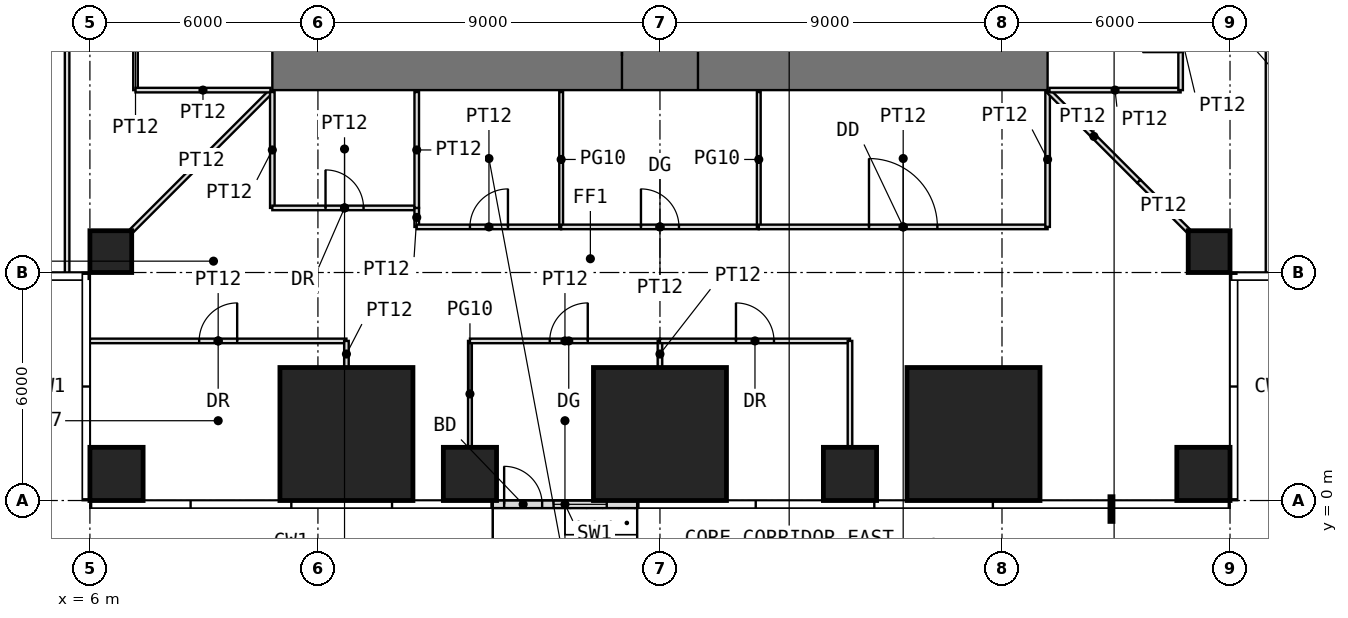
"""IFC4 building model, lengths in metres.
Left out: names, types, materials, properties, quantities, classifications, styles, units other than length and angle.
Written with IfcOpenShell. Run it as: python <this file> out.ifc"""

import sys

from ifc_helpers import new_model, si_unit, direction, frame, frame_2d, origin, origin_2d, place, context, subcontext, project, spatial, rectangle, extrude, element, fill, save


model = new_model("IFC4")
c1 = context("Model", 3, precision=1e-05, world=origin(), true_north=direction((0.0, 1.0)))
c2 = subcontext(c1, "Body", "Model", "MODEL_VIEW")
j1 = project(units=[si_unit("LENGTHUNIT", "METRE"), si_unit("PLANEANGLEUNIT", "RADIAN")], contexts=[c1])
p1 = place(None, origin())
s1 = spatial("IfcSite", under=j1, at=p1, CompositionType="ELEMENT")
p2 = place(p1, origin())
s2 = spatial("IfcBuilding", under=s1, at=p2, CompositionType="ELEMENT")
p3 = place(p2, frame((0.0, 0.0, 22.5)))
s3 = spatial("IfcBuildingStorey", under=s2, at=p3, CompositionType="ELEMENT", Elevation=22.5)
p4 = place(p3, frame((6.7, 0.7, 0.0), z_axis=(0.0, 0.0, 1.0), x_axis=(1.0, 0.0, 0.0)))
e1 = element("IfcColumn", 1, at=p4, inside=s3, PredefinedType="COLUMN", context=c2, shape_type="SweptSolid", body=[
    extrude(rectangle(XDim=1.4, YDim=1.4, at=origin_2d()), origin(), (0.0, 0.0, 1.0), 4.0),
])
p5 = place(p3, frame((12.75, 1.75, 0.0), z_axis=(0.0, 0.0, 1.0), x_axis=(1.0, 0.0, 0.0)))
e2 = element("IfcColumn", 2, at=p5, inside=s3, PredefinedType="COLUMN", context=c2, shape_type="SweptSolid", body=[
    extrude(rectangle(XDim=3.5, YDim=3.5, at=origin_2d()), origin(), (0.0, 0.0, 1.0), 4.0),
])
p6 = place(p3, frame((16.0, 0.7, 0.0), z_axis=(0.0, 0.0, 1.0), x_axis=(1.0, 0.0, 0.0)))
e3 = element("IfcColumn", 3, at=p6, inside=s3, PredefinedType="COLUMN", context=c2, shape_type="SweptSolid", body=[
    extrude(rectangle(XDim=1.4, YDim=1.4, at=origin_2d()), origin(), (0.0, 0.0, 1.0), 4.0),
])
p7 = place(p3, frame((21.0, 1.75, 0.0), z_axis=(0.0, 0.0, 1.0), x_axis=(1.0, 0.0, 0.0)))
e4 = element("IfcColumn", 4, at=p7, inside=s3, PredefinedType="COLUMN", context=c2, shape_type="SweptSolid", body=[
    extrude(rectangle(XDim=3.5, YDim=3.5, at=origin_2d()), origin(), (0.0, 0.0, 1.0), 4.0),
])
p8 = place(p3, frame((26.0, 0.7, 0.0), z_axis=(0.0, 0.0, 1.0), x_axis=(1.0, 0.0, 0.0)))
e5 = element("IfcColumn", 5, at=p8, inside=s3, PredefinedType="COLUMN", context=c2, shape_type="SweptSolid", body=[
    extrude(rectangle(XDim=1.4, YDim=1.4, at=origin_2d()), origin(), (0.0, 0.0, 1.0), 4.0),
])
p9 = place(p3, frame((29.25, 1.75, 0.0), z_axis=(0.0, 0.0, 1.0), x_axis=(1.0, 0.0, 0.0)))
e6 = element("IfcColumn", 6, at=p9, inside=s3, PredefinedType="COLUMN", context=c2, shape_type="SweptSolid", body=[
    extrude(rectangle(XDim=3.5, YDim=3.5, at=origin_2d()), origin(), (0.0, 0.0, 1.0), 4.0),
])
p10 = place(p3, frame((35.3, 0.7, 0.0), z_axis=(0.0, 0.0, 1.0), x_axis=(1.0, 0.0, 0.0)))
e7 = element("IfcColumn", 7, at=p10, inside=s3, PredefinedType="COLUMN", context=c2, shape_type="SweptSolid", body=[
    extrude(rectangle(XDim=1.4, YDim=1.4, at=origin_2d()), origin(), (0.0, 0.0, 1.0), 4.0),
])
for number, where, z_axis, x_axis in (
    (8, (6.55, 6.55, 0.0), (0.0, 0.0, 1.0), (1.0, 0.0, 0.0)),
    (9, (35.45, 6.55, 0.0), (0.0, 0.0, 1.0), (1.0, 0.0, 0.0)),
):
    element("IfcColumn", number, at=place(p3, frame(where, z_axis=z_axis, x_axis=x_axis)), inside=s3, PredefinedType="COLUMN", context=c2, shape_type="SweptSolid", body=[
        extrude(rectangle(XDim=1.1, YDim=1.1, at=origin_2d()), origin(), (0.0, 0.0, 1.0), 4.0),
    ])
p11 = place(p3, frame((16.6, -0.1, 0.0), z_axis=(0.0, 0.0, 1.0), x_axis=(1.0, 0.0, 0.0)))
e10 = element("IfcWall", 10, at=p11, inside=s3, PredefinedType="USERDEFINED", context=c2, shape_type="SweptSolid", body=[
    extrude(rectangle(XDim=3.8, YDim=0.2, at=frame_2d((1.9, 0.0))), origin(), (0.0, 0.0, 1.0), 3.75),
])
p12 = place(p11, frame((0.3, 0.0, 0.0)))
e11 = element("IfcOpeningElement", 11, at=p12, cuts=e10, PredefinedType="OPENING", context=c2, shape_type="SweptSolid", body=[
    extrude(rectangle(XDim=1.0, YDim=2.4, at=frame_2d((0.5, 1.2))), frame((0.0, 0.11, 0.0), z_axis=(0.0, -1.0, 0.0), x_axis=(1.0, 0.0, 0.0)), (0.0, 0.0, 1.0), 0.22),
])
p13 = place(p11, frame((1.6, 0.0, 0.3)))
e12 = element("IfcOpeningElement", 12, at=p13, cuts=e10, PredefinedType="OPENING", context=c2, shape_type="SweptSolid", body=[
    extrude(rectangle(XDim=1.4, YDim=2.7, at=frame_2d((0.7, 1.35))), frame((0.0, 0.11, 0.0), z_axis=(0.0, -1.0, 0.0), x_axis=(1.0, 0.0, 0.0)), (0.0, 0.0, 1.0), 0.22),
])
p14 = place(p3, frame((10.8, 11.7, -0.05), z_axis=(0.0, 0.0, 1.0), x_axis=(1.0, 0.0, 0.0)))
e13 = element("IfcWall", 13, at=p14, inside=s3, PredefinedType="SHEAR", context=c2, shape_type="SweptSolid", body=[
    extrude(rectangle(XDim=20.4, YDim=1.8, at=frame_2d((10.2, 0.0))), origin(), (0.0, 0.0, 1.0), 4.0),
])
p15 = place(p14, frame((9.2, 0.0, 0.05)))
e14 = element("IfcOpeningElement", 14, at=p15, cuts=e13, PredefinedType="OPENING", context=c2, shape_type="SweptSolid", body=[
    extrude(rectangle(XDim=2.0, YDim=2.2, at=frame_2d((1.0, 1.1))), frame((0.0, 0.91, 0.0), z_axis=(0.0, -1.0, 0.0), x_axis=(1.0, 0.0, 0.0)), (0.0, 0.0, 1.0), 1.82),
])
p16 = place(p3, frame((5.4, 6.0, 0.0), z_axis=(0.0, 0.0, 1.0), x_axis=(0.0, 1.0, 0.0)))
e15 = element("IfcWall", 15, at=p16, inside=s3, PredefinedType="PARTITIONING", context=c2, shape_type="SweptSolid", body=[
    extrude(rectangle(XDim=30.0, YDim=0.12, at=frame_2d((15.0, 0.0))), origin(), (0.0, 0.0, 1.0), 3.75),
])
p17 = place(p16, frame((14.5, 0.0, 0.0)))
e16 = element("IfcOpeningElement", 16, at=p17, cuts=e15, PredefinedType="OPENING", context=c2, shape_type="SweptSolid", body=[
    extrude(rectangle(XDim=1.0, YDim=2.4, at=frame_2d((0.5, 1.2))), frame((0.0, 0.07, 0.0), z_axis=(0.0, -1.0, 0.0), x_axis=(1.0, 0.0, 0.0)), (0.0, 0.0, 1.0), 0.14),
])
p18 = place(p3, frame((6.0, 4.2, 0.0), z_axis=(0.0, 0.0, 1.0), x_axis=(1.0, 0.0, 0.0)))
e17 = element("IfcWall", 17, at=p18, inside=s3, PredefinedType="PARTITIONING", context=c2, shape_type="SweptSolid", body=[
    extrude(rectangle(XDim=6.75, YDim=0.12, at=frame_2d((3.375, 0.0))), origin(), (0.0, 0.0, 1.0), 3.75),
])
p19 = place(p18, frame((2.875, 0.0, 0.0)))
e18 = element("IfcOpeningElement", 18, at=p19, cuts=e17, PredefinedType="OPENING", context=c2, shape_type="SweptSolid", body=[
    extrude(rectangle(XDim=1.0, YDim=2.2, at=frame_2d((0.5, 1.1))), frame((0.0, 0.07, 0.0), z_axis=(0.0, -1.0, 0.0), x_axis=(1.0, 0.0, 0.0)), (0.0, 0.0, 1.0), 0.14),
])
p20 = place(p3, frame((7.11, 7.11, 0.0), z_axis=(0.0, 0.0, 1.0), x_axis=(0.707106781187, 0.707106781187, 0.0)))
e19 = element("IfcWall", 19, at=p20, inside=s3, PredefinedType="PARTITIONING", context=c2, shape_type="SweptSolid", body=[
    extrude(rectangle(XDim=5.168, YDim=0.12, at=frame_2d((2.584, 0.0))), origin(), (0.0, 0.0, 1.0), 3.75),
])
p21 = place(p3, frame((7.2, 10.8, 0.0), z_axis=(0.0, 0.0, 1.0), x_axis=(0.0, 1.0, 0.0)))
e20 = element("IfcWall", 20, at=p21, inside=s3, PredefinedType="PARTITIONING", context=c2, shape_type="SweptSolid", body=[
    extrude(rectangle(XDim=3.8, YDim=0.12, at=frame_2d((1.9, 0.0))), origin(), (0.0, 0.0, 1.0), 3.75),
])
p22 = place(p21, frame((1.4, 0.0, 0.0)))
e21 = element("IfcOpeningElement", 21, at=p22, cuts=e20, PredefinedType="OPENING", context=c2, shape_type="SweptSolid", body=[
    extrude(rectangle(XDim=1.0, YDim=2.2, at=frame_2d((0.5, 1.1))), frame((0.0, 0.07, 0.0), z_axis=(0.0, -1.0, 0.0), x_axis=(1.0, 0.0, 0.0)), (0.0, 0.0, 1.0), 0.14),
])
p23 = place(p3, frame((7.2, 10.8, 0.0), z_axis=(0.0, 0.0, 1.0), x_axis=(1.0, 0.0, 0.0)))
e22 = element("IfcWall", 22, at=p23, inside=s3, PredefinedType="PARTITIONING", context=c2, shape_type="SweptSolid", body=[
    extrude(rectangle(XDim=3.55, YDim=0.12, at=frame_2d((1.775, 0.0))), origin(), (0.0, 0.0, 1.0), 3.75),
])
p24 = place(p3, frame((10.8, 7.7, 0.0), z_axis=(0.0, 0.0, 1.0), x_axis=(0.0, 1.0, 0.0)))
e23 = element("IfcWall", 23, at=p24, inside=s3, PredefinedType="PARTITIONING", context=c2, shape_type="SweptSolid", body=[
    extrude(rectangle(XDim=3.05, YDim=0.12, at=frame_2d((1.525, 0.0))), origin(), (0.0, 0.0, 1.0), 3.75),
])
p25 = place(p3, frame((10.8, 7.7, 0.0), z_axis=(0.0, 0.0, 1.0), x_axis=(1.0, 0.0, 0.0)))
e24 = element("IfcWall", 24, at=p25, inside=s3, PredefinedType="PARTITIONING", context=c2, shape_type="SweptSolid", body=[
    extrude(rectangle(XDim=3.8, YDim=0.12, at=frame_2d((1.9, 0.0))), origin(), (0.0, 0.0, 1.0), 3.75),
])
p26 = place(p25, frame((1.4, 0.0, 0.0)))
e25 = element("IfcOpeningElement", 25, at=p26, cuts=e24, PredefinedType="OPENING", context=c2, shape_type="SweptSolid", body=[
    extrude(rectangle(XDim=1.0, YDim=2.2, at=frame_2d((0.5, 1.1))), frame((0.0, 0.07, 0.0), z_axis=(0.0, -1.0, 0.0), x_axis=(1.0, 0.0, 0.0)), (0.0, 0.0, 1.0), 0.14),
])
p27 = place(p3, frame((12.75, 3.51, 0.0), z_axis=(0.0, 0.0, 1.0), x_axis=(0.0, 1.0, 0.0)))
e26 = element("IfcWall", 26, at=p27, inside=s3, PredefinedType="PARTITIONING", context=c2, shape_type="SweptSolid", body=[
    extrude(rectangle(XDim=0.69, YDim=0.12, at=frame_2d((0.345, 0.0))), origin(), (0.0, 0.0, 1.0), 3.75),
])
p28 = place(p3, frame((14.6, 7.2, 0.0), z_axis=(0.0, 0.0, 1.0), x_axis=(0.0, 1.0, 0.0)))
e27 = element("IfcWall", 27, at=p28, inside=s3, PredefinedType="PARTITIONING", context=c2, shape_type="SweptSolid", body=[
    extrude(rectangle(XDim=0.5, YDim=0.12, at=frame_2d((0.25, 0.0))), origin(), (0.0, 0.0, 1.0), 3.75),
])
p29 = place(p3, frame((14.6, 7.2, 0.0), z_axis=(0.0, 0.0, 1.0), x_axis=(1.0, 0.0, 0.0)))
e28 = element("IfcWall", 28, at=p29, inside=s3, PredefinedType="PARTITIONING", context=c2, shape_type="SweptSolid", body=[
    extrude(rectangle(XDim=3.8, YDim=0.12, at=frame_2d((1.9, 0.0))), origin(), (0.0, 0.0, 1.0), 3.75),
])
p30 = place(p29, frame((1.4, 0.0, 0.0)))
e29 = element("IfcOpeningElement", 29, at=p30, cuts=e28, PredefinedType="OPENING", context=c2, shape_type="SweptSolid", body=[
    extrude(rectangle(XDim=1.0, YDim=2.4, at=frame_2d((0.5, 1.2))), frame((0.0, 0.07, 0.0), z_axis=(0.0, -1.0, 0.0), x_axis=(1.0, 0.0, 0.0)), (0.0, 0.0, 1.0), 0.14),
])
p31 = place(p3, frame((14.6, 7.7, 0.0), z_axis=(0.0, 0.0, 1.0), x_axis=(0.0, 1.0, 0.0)))
e30 = element("IfcWall", 30, at=p31, inside=s3, PredefinedType="PARTITIONING", context=c2, shape_type="SweptSolid", body=[
    extrude(rectangle(XDim=3.05, YDim=0.12, at=frame_2d((1.525, 0.0))), origin(), (0.0, 0.0, 1.0), 3.75),
])
p32 = place(p3, frame((16.0, 1.41, 0.0), z_axis=(0.0, 0.0, 1.0), x_axis=(0.0, 1.0, 0.0)))
e31 = element("IfcWall", 31, at=p32, inside=s3, PredefinedType="PARTITIONING", context=c2, shape_type="SweptSolid", body=[
    extrude(rectangle(XDim=2.79, YDim=0.1, at=frame_2d((1.395, 0.0))), origin(), (0.0, 0.0, 1.0), 3.75),
])
p33 = place(p3, frame((16.0, 4.2, 0.0), z_axis=(0.0, 0.0, 1.0), x_axis=(1.0, 0.0, 0.0)))
e32 = element("IfcWall", 32, at=p33, inside=s3, PredefinedType="PARTITIONING", context=c2, shape_type="SweptSolid", body=[
    extrude(rectangle(XDim=5.0, YDim=0.12, at=frame_2d((2.5, 0.0))), origin(), (0.0, 0.0, 1.0), 3.75),
])
p34 = place(p33, frame((2.1, 0.0, 0.0)))
e33 = element("IfcOpeningElement", 33, at=p34, cuts=e32, PredefinedType="OPENING", context=c2, shape_type="SweptSolid", body=[
    extrude(rectangle(XDim=1.0, YDim=2.4, at=frame_2d((0.5, 1.2))), frame((0.0, 0.07, 0.0), z_axis=(0.0, -1.0, 0.0), x_axis=(1.0, 0.0, 0.0)), (0.0, 0.0, 1.0), 0.14),
])
p35 = place(p3, frame((18.4, 7.2, 0.0), z_axis=(0.0, 0.0, 1.0), x_axis=(0.0, 1.0, 0.0)))
e34 = element("IfcWall", 34, at=p35, inside=s3, PredefinedType="PARTITIONING", context=c2, shape_type="SweptSolid", body=[
    extrude(rectangle(XDim=3.55, YDim=0.1, at=frame_2d((1.775, 0.0))), origin(), (0.0, 0.0, 1.0), 3.75),
])
p36 = place(p3, frame((18.4, 7.2, 0.0), z_axis=(0.0, 0.0, 1.0), x_axis=(1.0, 0.0, 0.0)))
e35 = element("IfcWall", 35, at=p36, inside=s3, PredefinedType="PARTITIONING", context=c2, shape_type="SweptSolid", body=[
    extrude(rectangle(XDim=5.2, YDim=0.12, at=frame_2d((2.6, 0.0))), origin(), (0.0, 0.0, 1.0), 3.75),
])
p37 = place(p36, frame((2.1, 0.0, 0.0)))
e36 = element("IfcOpeningElement", 36, at=p37, cuts=e35, PredefinedType="OPENING", context=c2, shape_type="SweptSolid", body=[
    extrude(rectangle(XDim=1.0, YDim=2.4, at=frame_2d((0.5, 1.2))), frame((0.0, 0.07, 0.0), z_axis=(0.0, -1.0, 0.0), x_axis=(1.0, 0.0, 0.0)), (0.0, 0.0, 1.0), 0.14),
])
p38 = place(p3, frame((21.0, 3.51, 0.0), z_axis=(0.0, 0.0, 1.0), x_axis=(0.0, 1.0, 0.0)))
e37 = element("IfcWall", 37, at=p38, inside=s3, PredefinedType="PARTITIONING", context=c2, shape_type="SweptSolid", body=[
    extrude(rectangle(XDim=0.69, YDim=0.12, at=frame_2d((0.345, 0.0))), origin(), (0.0, 0.0, 1.0), 3.75),
])
p39 = place(p3, frame((21.0, 4.2, 0.0), z_axis=(0.0, 0.0, 1.0), x_axis=(1.0, 0.0, 0.0)))
e38 = element("IfcWall", 38, at=p39, inside=s3, PredefinedType="PARTITIONING", context=c2, shape_type="SweptSolid", body=[
    extrude(rectangle(XDim=5.0, YDim=0.12, at=frame_2d((2.5, 0.0))), origin(), (0.0, 0.0, 1.0), 3.75),
])
p40 = place(p39, frame((2.0, 0.0, 0.0)))
e39 = element("IfcOpeningElement", 39, at=p40, cuts=e38, PredefinedType="OPENING", context=c2, shape_type="SweptSolid", body=[
    extrude(rectangle(XDim=1.0, YDim=2.2, at=frame_2d((0.5, 1.1))), frame((0.0, 0.07, 0.0), z_axis=(0.0, -1.0, 0.0), x_axis=(1.0, 0.0, 0.0)), (0.0, 0.0, 1.0), 0.14),
])
p41 = place(p3, frame((23.6, 7.2, 0.0), z_axis=(0.0, 0.0, 1.0), x_axis=(0.0, 1.0, 0.0)))
e40 = element("IfcWall", 40, at=p41, inside=s3, PredefinedType="PARTITIONING", context=c2, shape_type="SweptSolid", body=[
    extrude(rectangle(XDim=3.55, YDim=0.1, at=frame_2d((1.775, 0.0))), origin(), (0.0, 0.0, 1.0), 3.75),
])
p42 = place(p3, frame((23.6, 7.2, 0.0), z_axis=(0.0, 0.0, 1.0), x_axis=(1.0, 0.0, 0.0)))
e41 = element("IfcWall", 41, at=p42, inside=s3, PredefinedType="PARTITIONING", context=c2, shape_type="SweptSolid", body=[
    extrude(rectangle(XDim=7.6, YDim=0.12, at=frame_2d((3.8, 0.0))), origin(), (0.0, 0.0, 1.0), 3.75),
])
p43 = place(p42, frame((2.9, 0.0, 0.0)))
e42 = element("IfcOpeningElement", 42, at=p43, cuts=e41, PredefinedType="OPENING", context=c2, shape_type="SweptSolid", body=[
    extrude(rectangle(XDim=1.8, YDim=2.4, at=frame_2d((0.9, 1.2))), frame((0.0, 0.07, 0.0), z_axis=(0.0, -1.0, 0.0), x_axis=(1.0, 0.0, 0.0)), (0.0, 0.0, 1.0), 0.14),
])
p44 = place(p3, frame((26.0, 1.41, 0.0), z_axis=(0.0, 0.0, 1.0), x_axis=(0.0, 1.0, 0.0)))
e43 = element("IfcWall", 43, at=p44, inside=s3, PredefinedType="PARTITIONING", context=c2, shape_type="SweptSolid", body=[
    extrude(rectangle(XDim=2.79, YDim=0.12, at=frame_2d((1.395, 0.0))), origin(), (0.0, 0.0, 1.0), 3.75),
])
p45 = place(p3, frame((31.2, 7.2, 0.0), z_axis=(0.0, 0.0, 1.0), x_axis=(0.0, 1.0, 0.0)))
e44 = element("IfcWall", 44, at=p45, inside=s3, PredefinedType="PARTITIONING", context=c2, shape_type="SweptSolid", body=[
    extrude(rectangle(XDim=3.55, YDim=0.12, at=frame_2d((1.775, 0.0))), origin(), (0.0, 0.0, 1.0), 3.75),
])
p46 = place(p3, frame((31.235, 10.765, 0.0), z_axis=(0.0, 0.0, 1.0), x_axis=(0.707106781187, -0.707106781187, 0.0)))
e45 = element("IfcWall", 45, at=p46, inside=s3, PredefinedType="PARTITIONING", context=c2, shape_type="SweptSolid", body=[
    extrude(rectangle(XDim=3.346, YDim=0.12, at=frame_2d((1.673, 0.0))), origin(), (0.0, 0.0, 1.0), 3.75),
])
p47 = place(p3, frame((31.25, 10.8, 0.0), z_axis=(0.0, 0.0, 1.0), x_axis=(1.0, 0.0, 0.0)))
e46 = element("IfcWall", 46, at=p47, inside=s3, PredefinedType="PARTITIONING", context=c2, shape_type="SweptSolid", body=[
    extrude(rectangle(XDim=3.45, YDim=0.12, at=frame_2d((1.725, 0.0))), origin(), (0.0, 0.0, 1.0), 3.75),
])
p48 = place(p3, frame((33.602, 8.398, 0.0), z_axis=(0.0, 0.0, 1.0), x_axis=(0.707106781187, -0.707106781187, 0.0)))
e47 = element("IfcWall", 47, at=p48, inside=s3, PredefinedType="PARTITIONING", context=c2, shape_type="SweptSolid", body=[
    extrude(rectangle(XDim=1.822, YDim=0.12, at=frame_2d((0.911, 0.0))), origin(), (0.0, 0.0, 1.0), 3.75),
])
p49 = place(p3, frame((34.7, 10.8, 0.0), z_axis=(0.0, 0.0, 1.0), x_axis=(0.0, 1.0, 0.0)))
e48 = element("IfcWall", 48, at=p49, inside=s3, PredefinedType="PARTITIONING", context=c2, shape_type="SweptSolid", body=[
    extrude(rectangle(XDim=3.0, YDim=0.12, at=frame_2d((1.5, 0.0))), origin(), (0.0, 0.0, 1.0), 3.75),
])
p50 = place(p49, frame((1.0, 0.0, 0.0)))
e49 = element("IfcOpeningElement", 49, at=p50, cuts=e48, PredefinedType="OPENING", context=c2, shape_type="SweptSolid", body=[
    extrude(rectangle(XDim=1.0, YDim=2.2, at=frame_2d((0.5, 1.1))), frame((0.0, 0.07, 0.0), z_axis=(0.0, -1.0, 0.0), x_axis=(1.0, 0.0, 0.0)), (0.0, 0.0, 1.0), 0.14),
])
p51 = place(p3, frame((37.0, 6.0, 0.0), z_axis=(0.0, 0.0, 1.0), x_axis=(0.0, 1.0, 0.0)))
e50 = element("IfcWall", 50, at=p51, inside=s3, PredefinedType="PARTITIONING", context=c2, shape_type="SweptSolid", body=[
    extrude(rectangle(XDim=30.0, YDim=0.12, at=frame_2d((15.0, 0.0))), origin(), (0.0, 0.0, 1.0), 3.75),
])
p52 = place(p51, frame((14.5, 0.0, 0.0)))
e51 = element("IfcOpeningElement", 51, at=p52, cuts=e50, PredefinedType="OPENING", context=c2, shape_type="SweptSolid", body=[
    extrude(rectangle(XDim=1.0, YDim=2.4, at=frame_2d((0.5, 1.2))), frame((0.0, 0.07, 0.0), z_axis=(0.0, -1.0, 0.0), x_axis=(1.0, 0.0, 0.0)), (0.0, 0.0, 1.0), 0.14),
])
p53 = place(p12, origin())
e52 = element("IfcDoor", 52, at=p53, inside=s3, OperationType="SINGLE_SWING_LEFT", PredefinedType="DOOR", context=c2, shape_type="SweptSolid", body=[
    extrude(rectangle(XDim=1.0, YDim=2.4, at=frame_2d((0.5, 1.2))), frame((0.0, 0.025, 0.0), z_axis=(0.0, -1.0, 0.0), x_axis=(1.0, 0.0, 0.0)), (0.0, 0.0, 1.0), 0.05),
])
fill(e11, e52)
p54 = place(p13, origin())
e53 = element("IfcWindow", 53, at=p54, inside=s3, PartitioningType="SINGLE_PANEL", PredefinedType="WINDOW", context=c2, shape_type="SweptSolid", body=[
    extrude(rectangle(XDim=1.4, YDim=2.7, at=frame_2d((0.7, 1.35))), frame((0.0, 0.03, 0.0), z_axis=(0.0, -1.0, 0.0), x_axis=(1.0, 0.0, 0.0)), (0.0, 0.0, 1.0), 0.06),
])
fill(e12, e53)
p55 = place(p15, origin())
e54 = element("IfcDoor", 54, at=p55, inside=s3, OperationType="DOUBLE_DOOR_SINGLE_SWING", PredefinedType="DOOR", context=c2, shape_type="SweptSolid", body=[
    extrude(rectangle(XDim=2.0, YDim=2.2, at=frame_2d((1.0, 1.1))), frame((0.0, 0.025, 0.0), z_axis=(0.0, -1.0, 0.0), x_axis=(1.0, 0.0, 0.0)), (0.0, 0.0, 1.0), 0.05),
])
fill(e14, e54)
p56 = place(p26, origin())
e55 = element("IfcDoor", 55, at=p56, inside=s3, OperationType="SINGLE_SWING_LEFT", PredefinedType="DOOR", context=c2, shape_type="SweptSolid", body=[
    extrude(rectangle(XDim=1.0, YDim=2.2, at=frame_2d((0.5, 1.1))), frame((0.0, 0.025, 0.0), z_axis=(0.0, -1.0, 0.0), x_axis=(1.0, 0.0, 0.0)), (0.0, 0.0, 1.0), 0.05),
])
fill(e25, e55)
p57 = place(p30, origin())
e56 = element("IfcDoor", 56, at=p57, inside=s3, OperationType="SINGLE_SWING_RIGHT", PredefinedType="DOOR", context=c2, shape_type="SweptSolid", body=[
    extrude(rectangle(XDim=1.0, YDim=2.4, at=frame_2d((0.5, 1.2))), frame((0.0, 0.025, 0.0), z_axis=(0.0, -1.0, 0.0), x_axis=(1.0, 0.0, 0.0)), (0.0, 0.0, 1.0), 0.05),
])
fill(e29, e56)
p58 = place(p43, origin())
e57 = element("IfcDoor", 57, at=p58, inside=s3, OperationType="DOUBLE_DOOR_SINGLE_SWING", PredefinedType="DOOR", context=c2, shape_type="SweptSolid", body=[
    extrude(rectangle(XDim=1.8, YDim=2.4, at=frame_2d((0.9, 1.2))), frame((0.0, 0.025, 0.0), z_axis=(0.0, -1.0, 0.0), x_axis=(1.0, 0.0, 0.0)), (0.0, 0.0, 1.0), 0.05),
])
fill(e42, e57)
p59 = place(p19, origin())
e58 = element("IfcDoor", 58, at=p59, inside=s3, OperationType="SINGLE_SWING_RIGHT", PredefinedType="DOOR", context=c2, shape_type="SweptSolid", body=[
    extrude(rectangle(XDim=1.0, YDim=2.2, at=frame_2d((0.5, 1.1))), frame((0.0, 0.025, 0.0), z_axis=(0.0, -1.0, 0.0), x_axis=(1.0, 0.0, 0.0)), (0.0, 0.0, 1.0), 0.05),
])
fill(e18, e58)
p60 = place(p34, origin())
e59 = element("IfcDoor", 59, at=p60, inside=s3, OperationType="SINGLE_SWING_RIGHT", PredefinedType="DOOR", context=c2, shape_type="SweptSolid", body=[
    extrude(rectangle(XDim=1.0, YDim=2.4, at=frame_2d((0.5, 1.2))), frame((0.0, 0.025, 0.0), z_axis=(0.0, -1.0, 0.0), x_axis=(1.0, 0.0, 0.0)), (0.0, 0.0, 1.0), 0.05),
])
fill(e33, e59)
p61 = place(p40, origin())
e60 = element("IfcDoor", 60, at=p61, inside=s3, OperationType="SINGLE_SWING_LEFT", PredefinedType="DOOR", context=c2, shape_type="SweptSolid", body=[
    extrude(rectangle(XDim=1.0, YDim=2.2, at=frame_2d((0.5, 1.1))), frame((0.0, 0.025, 0.0), z_axis=(0.0, -1.0, 0.0), x_axis=(1.0, 0.0, 0.0)), (0.0, 0.0, 1.0), 0.05),
])
fill(e39, e60)
p62 = place(p37, origin())
e61 = element("IfcDoor", 61, at=p62, inside=s3, OperationType="SINGLE_SWING_LEFT", PredefinedType="DOOR", context=c2, shape_type="SweptSolid", body=[
    extrude(rectangle(XDim=1.0, YDim=2.4, at=frame_2d((0.5, 1.2))), frame((0.0, 0.025, 0.0), z_axis=(0.0, -1.0, 0.0), x_axis=(1.0, 0.0, 0.0)), (0.0, 0.0, 1.0), 0.05),
])
fill(e36, e61)
save(model, sys.argv[1])
